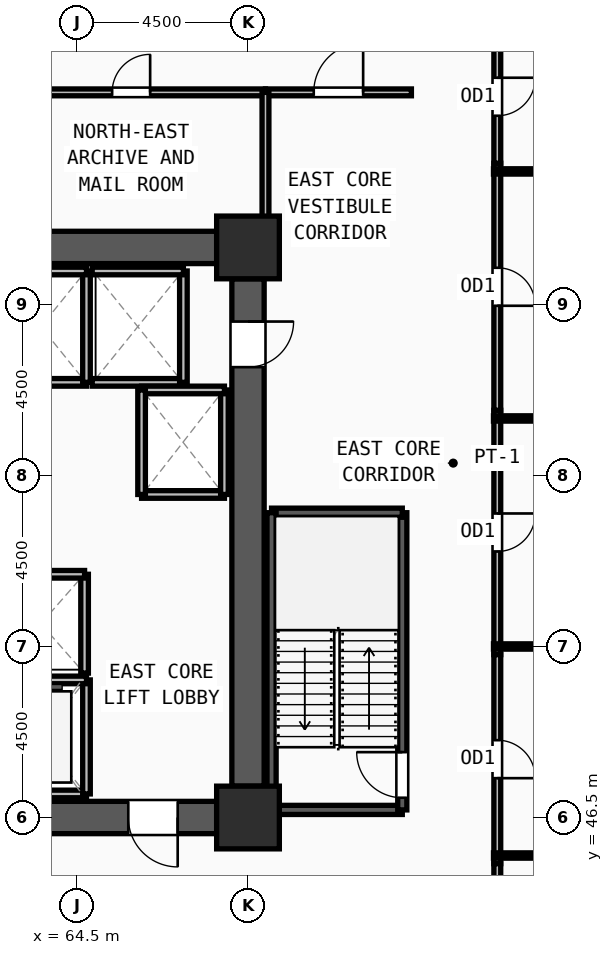
"""IFC4 building model, lengths in metres.
Left out: names, types, materials, properties, quantities, classifications, styles, units other than length and angle.
Written with IfcOpenShell. Run it as: python <this file> out.ifc"""

import sys

from ifc_helpers import new_model, si_unit, direction, frame, frame_2d, origin, origin_2d, place, context, subcontext, project, spatial, rectangle, extrude, source, transform, mapped, element, fill, save


model = new_model("IFC4")
c1 = context("Model", 3, precision=1e-05, world=origin(), true_north=direction((0.0, 1.0)))
c2 = subcontext(c1, "Body", "Model", "MODEL_VIEW")
j1 = project(units=[si_unit("LENGTHUNIT", "METRE"), si_unit("PLANEANGLEUNIT", "RADIAN")], contexts=[c1])
p1 = place(None, origin())
s1 = spatial("IfcSite", under=j1, at=p1, CompositionType="ELEMENT")
p2 = place(p1, origin())
s2 = spatial("IfcBuilding", under=s1, at=p2, CompositionType="ELEMENT")
p3 = place(p2, frame((0.0, 0.0, 74.25)))
s3 = spatial("IfcBuildingStorey", under=s2, at=p3, CompositionType="ELEMENT", Elevation=74.25)
m1 = source(origin(), c2, "Body", "SweptSolid", [
    extrude(rectangle(XDim=1.65, YDim=1.65, at=origin_2d()), origin(), (0.0, 0.0, 1.0), 3.75),
])
for number, where, z_axis, x_axis in (
    (1, (69.0, 46.5, 0.0), (0.0, 0.0, 1.0), (1.0, 0.0, 0.0)),
    (2, (69.0, 61.5, 0.0), (0.0, 0.0, 1.0), (1.0, 0.0, 0.0)),
):
    element("IfcColumn", number, at=place(p3, frame(where, z_axis=z_axis, x_axis=x_axis)), inside=s3, PredefinedType="COLUMN", context=c2, shape_type="MappedRepresentation", body=[
        mapped(m1, transform((0.0, 0.0, 0.0), x_axis=(1.0, 0.0, 0.0), y_axis=(0.0, 1.0, 0.0), z_axis=(0.0, 0.0, 1.0), scale=1.0)),
    ])
p4 = place(p3, frame((60.825, 61.5, 0.0), z_axis=(0.0, 0.0, 1.0), x_axis=(1.0, 0.0, 0.0)))
e3 = element("IfcWall", 3, at=p4, inside=s3, PredefinedType="SHEAR", context=c2, shape_type="SweptSolid", body=[
    extrude(rectangle(XDim=7.35, YDim=0.85, at=frame_2d((3.675, 0.0))), origin(), (0.0, 0.0, 1.0), 3.57),
])
p5 = place(p3, frame((69.0, 60.675, 0.0), z_axis=(0.0, 0.0, 1.0), x_axis=(0.0, -1.0, 0.0)))
e4 = element("IfcWall", 4, at=p5, inside=s3, PredefinedType="SHEAR", context=c2, shape_type="SweptSolid", body=[
    extrude(rectangle(XDim=13.35, YDim=0.85, at=frame_2d((6.675, 0.0))), origin(), (0.0, 0.0, 1.0), 3.57),
])
m2 = source(origin(), c2, "Body", "SweptSolid", [
    extrude(rectangle(XDim=1.2, YDim=2.2, at=frame_2d((0.6, 1.1))), frame((0.0, 0.435, 0.0), z_axis=(0.0, -1.0, 0.0), x_axis=(1.0, 0.0, 0.0)), (0.0, 0.0, 1.0), 0.87),
])
p6 = place(p5, frame((1.125, 0.0, 0.0)))
e5 = element("IfcOpeningElement", 5, at=p6, cuts=e4, PredefinedType="OPENING", context=c2, shape_type="MappedRepresentation", body=[
    mapped(m2, transform((0.0, 0.0, 0.0), x_axis=(1.0, 0.0, 0.0), y_axis=(0.0, 1.0, 0.0), z_axis=(0.0, 0.0, 1.0), scale=1.0)),
])
p7 = place(p3, frame((68.175, 46.5, 0.0), z_axis=(0.0, 0.0, 1.0), x_axis=(-1.0, 0.0, 0.0)))
e6 = element("IfcWall", 6, at=p7, inside=s3, PredefinedType="SHEAR", context=c2, shape_type="SweptSolid", body=[
    extrude(rectangle(XDim=7.35, YDim=0.85, at=frame_2d((3.675, 0.0))), origin(), (0.0, 0.0, 1.0), 3.57),
])
m3 = source(origin(), c2, "Body", "SweptSolid", [
    extrude(rectangle(XDim=1.3, YDim=2.2, at=frame_2d((0.65, 1.1))), frame((0.0, 0.435, 0.0), z_axis=(0.0, -1.0, 0.0), x_axis=(1.0, 0.0, 0.0)), (0.0, 0.0, 1.0), 0.87),
])
p8 = place(p7, frame((1.025, 0.0, 0.0)))
e7 = element("IfcOpeningElement", 7, at=p8, cuts=e6, PredefinedType="OPENING", context=c2, shape_type="MappedRepresentation", body=[
    mapped(m3, transform((0.0, 0.0, 0.0), x_axis=(1.0, 0.0, 0.0), y_axis=(0.0, 1.0, 0.0), z_axis=(0.0, 0.0, 1.0), scale=1.0)),
])
p9 = place(p3, frame((69.62, 46.7, 0.0), z_axis=(0.0, 0.0, 1.0), x_axis=(1.0, 0.0, 0.0)))
e8 = element("IfcWall", 8, at=p9, inside=s3, PredefinedType="SOLIDWALL", context=c2, shape_type="SweptSolid", body=[
    extrude(rectangle(XDim=3.44, YDim=0.24, at=frame_2d((1.72, 0.0))), origin(), (0.0, 0.0, 1.0), 3.57),
])
p10 = place(p3, frame((73.06, 46.7, 0.0), z_axis=(0.0, 0.0, 1.0), x_axis=(0.0, 1.0, 0.0)))
e9 = element("IfcWall", 9, at=p10, inside=s3, PredefinedType="SOLIDWALL", context=c2, shape_type="SweptSolid", body=[
    extrude(rectangle(XDim=7.82, YDim=0.24, at=frame_2d((3.91, 0.0))), origin(), (0.0, 0.0, 1.0), 3.57),
])
m4 = source(origin(), c2, "Body", "SweptSolid", [
    extrude(rectangle(XDim=1.2, YDim=2.2, at=frame_2d((0.6, 1.1))), frame((0.0, 0.13, 0.0), z_axis=(0.0, -1.0, 0.0), x_axis=(1.0, 0.0, 0.0)), (0.0, 0.0, 1.0), 0.26),
])
p11 = place(p10, frame((0.32, 0.0, 0.0)))
e10 = element("IfcOpeningElement", 10, at=p11, cuts=e9, PredefinedType="OPENING", context=c2, shape_type="MappedRepresentation", body=[
    mapped(m4, transform((0.0, 0.0, 0.0), x_axis=(1.0, 0.0, 0.0), y_axis=(0.0, 1.0, 0.0), z_axis=(0.0, 0.0, 1.0), scale=1.0)),
])
p12 = place(p3, frame((73.06, 54.52, 0.0), z_axis=(0.0, 0.0, 1.0), x_axis=(-1.0, 0.0, 0.0)))
e11 = element("IfcWall", 11, at=p12, inside=s3, PredefinedType="SOLIDWALL", context=c2, shape_type="SweptSolid", body=[
    extrude(rectangle(XDim=3.44, YDim=0.24, at=frame_2d((1.72, 0.0))), origin(), (0.0, 0.0, 1.0), 3.57),
])
p13 = place(p3, frame((69.62, 54.52, 0.0), z_axis=(0.0, 0.0, 1.0), x_axis=(0.0, -1.0, 0.0)))
e12 = element("IfcWall", 12, at=p13, inside=s3, PredefinedType="SOLIDWALL", context=c2, shape_type="SweptSolid", body=[
    extrude(rectangle(XDim=7.82, YDim=0.24, at=frame_2d((3.91, 0.0))), origin(), (0.0, 0.0, 1.0), 3.57),
])
p14 = place(p3, frame((62.35, 47.12, 0.0), z_axis=(0.0, 0.0, 1.0), x_axis=(1.0, 0.0, 0.0)))
e13 = element("IfcWall", 13, at=p14, inside=s3, PredefinedType="SOLIDWALL", context=c2, shape_type="SweptSolid", body=[
    extrude(rectangle(XDim=2.4, YDim=0.2, at=frame_2d((1.2, 0.0))), origin(), (0.0, 0.0, 1.0), 3.57),
])
p15 = place(p3, frame((64.75, 47.12, 0.0), z_axis=(0.0, 0.0, 1.0), x_axis=(0.0, 1.0, 0.0)))
e14 = element("IfcWall", 14, at=p15, inside=s3, PredefinedType="SOLIDWALL", context=c2, shape_type="SweptSolid", body=[
    extrude(rectangle(XDim=3.0, YDim=0.2, at=frame_2d((1.5, 0.0))), origin(), (0.0, 0.0, 1.0), 3.57),
])
for number, where, z_axis, x_axis in (
    (15, (64.75, 50.12, 0.0), (0.0, 0.0, 1.0), (-1.0, 0.0, 0.0)),
    (16, (62.35, 57.95, 0.0), (0.0, 0.0, 1.0), (1.0, 0.0, 0.0)),
):
    element("IfcWall", number, at=place(p3, frame(where, z_axis=z_axis, x_axis=x_axis)), inside=s3, PredefinedType="SOLIDWALL", context=c2, shape_type="SweptSolid", body=[
        extrude(rectangle(XDim=2.4, YDim=0.2, at=frame_2d((1.2, 0.0))), origin(), (0.0, 0.0, 1.0), 3.57),
    ])
p16 = place(p3, frame((64.75, 57.95, 0.0), z_axis=(0.0, 0.0, 1.0), x_axis=(0.0, 1.0, 0.0)))
e17 = element("IfcWall", 17, at=p16, inside=s3, PredefinedType="SOLIDWALL", context=c2, shape_type="SweptSolid", body=[
    extrude(rectangle(XDim=2.93, YDim=0.2, at=frame_2d((1.465, 0.0))), origin(), (0.0, 0.0, 1.0), 3.57),
])
p17 = place(p3, frame((64.75, 60.88, 0.0), z_axis=(0.0, 0.0, 1.0), x_axis=(-1.0, 0.0, 0.0)))
e18 = element("IfcWall", 18, at=p17, inside=s3, PredefinedType="SOLIDWALL", context=c2, shape_type="SweptSolid", body=[
    extrude(rectangle(XDim=2.4, YDim=0.2, at=frame_2d((1.2, 0.0))), origin(), (0.0, 0.0, 1.0), 3.57),
])
p18 = place(p3, frame((64.9, 57.95, 0.0), z_axis=(0.0, 0.0, 1.0), x_axis=(1.0, 0.0, 0.0)))
e19 = element("IfcWall", 19, at=p18, inside=s3, PredefinedType="SOLIDWALL", context=c2, shape_type="SweptSolid", body=[
    extrude(rectangle(XDim=2.4, YDim=0.2, at=frame_2d((1.2, 0.0))), origin(), (0.0, 0.0, 1.0), 3.57),
])
p19 = place(p3, frame((67.3, 57.95, 0.0), z_axis=(0.0, 0.0, 1.0), x_axis=(0.0, 1.0, 0.0)))
e20 = element("IfcWall", 20, at=p19, inside=s3, PredefinedType="SOLIDWALL", context=c2, shape_type="SweptSolid", body=[
    extrude(rectangle(XDim=2.93, YDim=0.2, at=frame_2d((1.465, 0.0))), origin(), (0.0, 0.0, 1.0), 3.57),
])
p20 = place(p3, frame((67.3, 60.88, 0.0), z_axis=(0.0, 0.0, 1.0), x_axis=(-1.0, 0.0, 0.0)))
e21 = element("IfcWall", 21, at=p20, inside=s3, PredefinedType="SOLIDWALL", context=c2, shape_type="SweptSolid", body=[
    extrude(rectangle(XDim=2.4, YDim=0.2, at=frame_2d((1.2, 0.0))), origin(), (0.0, 0.0, 1.0), 3.57),
])
p21 = place(p3, frame((66.2, 55.0, 0.0), z_axis=(0.0, 0.0, 1.0), x_axis=(1.0, 0.0, 0.0)))
e22 = element("IfcWall", 22, at=p21, inside=s3, PredefinedType="SOLIDWALL", context=c2, shape_type="SweptSolid", body=[
    extrude(rectangle(XDim=2.18, YDim=0.2, at=frame_2d((1.09, 0.0))), origin(), (0.0, 0.0, 1.0), 3.57),
])
p22 = place(p3, frame((68.38, 55.0, 0.0), z_axis=(0.0, 0.0, 1.0), x_axis=(0.0, 1.0, 0.0)))
e23 = element("IfcWall", 23, at=p22, inside=s3, PredefinedType="SOLIDWALL", context=c2, shape_type="SweptSolid", body=[
    extrude(rectangle(XDim=2.75, YDim=0.2, at=frame_2d((1.375, 0.0))), origin(), (0.0, 0.0, 1.0), 3.57),
])
p23 = place(p3, frame((68.38, 57.75, 0.0), z_axis=(0.0, 0.0, 1.0), x_axis=(-1.0, 0.0, 0.0)))
e24 = element("IfcWall", 24, at=p23, inside=s3, PredefinedType="SOLIDWALL", context=c2, shape_type="SweptSolid", body=[
    extrude(rectangle(XDim=2.18, YDim=0.2, at=frame_2d((1.09, 0.0))), origin(), (0.0, 0.0, 1.0), 3.57),
])
p24 = place(p3, frame((66.2, 57.75, 0.0), z_axis=(0.0, 0.0, 1.0), x_axis=(0.0, -1.0, 0.0)))
e25 = element("IfcWall", 25, at=p24, inside=s3, PredefinedType="SOLIDWALL", context=c2, shape_type="SweptSolid", body=[
    extrude(rectangle(XDim=2.75, YDim=0.2, at=frame_2d((1.375, 0.0))), origin(), (0.0, 0.0, 1.0), 3.57),
])
p25 = place(p3, frame((64.7, 50.3, 0.0), z_axis=(0.0, 0.0, 1.0), x_axis=(0.0, 1.0, 0.0)))
e26 = element("IfcWall", 26, at=p25, inside=s3, PredefinedType="SOLIDWALL", context=c2, shape_type="SweptSolid", body=[
    extrude(rectangle(XDim=2.6, YDim=0.2, at=frame_2d((1.3, 0.0))), origin(), (0.0, 0.0, 1.0), 3.57),
])
p26 = place(p3, frame((64.7, 52.9, 0.0), z_axis=(0.0, 0.0, 1.0), x_axis=(-1.0, 0.0, 0.0)))
e27 = element("IfcWall", 27, at=p26, inside=s3, PredefinedType="SOLIDWALL", context=c2, shape_type="SweptSolid", body=[
    extrude(rectangle(XDim=2.3, YDim=0.2, at=frame_2d((1.15, 0.0))), origin(), (0.0, 0.0, 1.0), 3.57),
])
p27 = place(p3, frame((62.39, 65.58, 0.0), z_axis=(0.0, 0.0, 1.0), x_axis=(1.0, 0.0, 0.0)))
e28 = element("IfcWall", 28, at=p27, inside=s3, PredefinedType="PARTITIONING", context=c2, shape_type="SweptSolid", body=[
    extrude(rectangle(XDim=7.07, YDim=0.18, at=frame_2d((3.535, 0.0))), origin(), (0.0, 0.0, 1.0), 3.57),
])
m5 = source(origin(), c2, "Body", "SweptSolid", [
    extrude(rectangle(XDim=1.0, YDim=2.2, at=frame_2d((0.5, 1.1))), frame((0.0, 0.1, 0.0), z_axis=(0.0, -1.0, 0.0), x_axis=(1.0, 0.0, 0.0)), (0.0, 0.0, 1.0), 0.2),
])
p28 = place(p27, frame((3.035, 0.0, 0.0)))
e29 = element("IfcOpeningElement", 29, at=p28, cuts=e28, PredefinedType="OPENING", context=c2, shape_type="MappedRepresentation", body=[
    mapped(m5, transform((0.0, 0.0, 0.0), x_axis=(1.0, 0.0, 0.0), y_axis=(0.0, 1.0, 0.0), z_axis=(0.0, 0.0, 1.0), scale=1.0)),
])
p29 = place(p3, frame((69.46, 65.58, 0.0), z_axis=(0.0, 0.0, 1.0), x_axis=(1.0, 0.0, 0.0)))
e30 = element("IfcWall", 30, at=p29, inside=s3, PredefinedType="PARTITIONING", context=c2, shape_type="SweptSolid", body=[
    extrude(rectangle(XDim=3.84, YDim=0.18, at=frame_2d((1.92, 0.0))), origin(), (0.0, 0.0, 1.0), 3.57),
])
m6 = source(origin(), c2, "Body", "SweptSolid", [
    extrude(rectangle(XDim=1.3, YDim=2.2, at=frame_2d((0.65, 1.1))), frame((0.0, 0.1, 0.0), z_axis=(0.0, -1.0, 0.0), x_axis=(1.0, 0.0, 0.0)), (0.0, 0.0, 1.0), 0.2),
])
p30 = place(p29, frame((1.27, 0.0, 0.0)))
e31 = element("IfcOpeningElement", 31, at=p30, cuts=e30, PredefinedType="OPENING", context=c2, shape_type="MappedRepresentation", body=[
    mapped(m6, transform((0.0, 0.0, 0.0), x_axis=(1.0, 0.0, 0.0), y_axis=(0.0, 1.0, 0.0), z_axis=(0.0, 0.0, 1.0), scale=1.0)),
])
p31 = place(p3, frame((75.56, 57.215, 0.0), z_axis=(0.0, 0.0, 1.0), x_axis=(0.0, -1.0, 0.0)))
e32 = element("IfcWall", 32, at=p31, inside=s3, PredefinedType="PARTITIONING", context=c2, shape_type="SweptSolid", body=[
    extrude(rectangle(XDim=6.43, YDim=0.18, at=frame_2d((3.215, 0.0))), origin(), (0.0, 0.0, 1.0), 3.57),
])
p32 = place(p31, frame((2.715, 0.0, 0.0)))
e33 = element("IfcOpeningElement", 33, at=p32, cuts=e32, PredefinedType="OPENING", context=c2, shape_type="MappedRepresentation", body=[
    mapped(m5, transform((0.0, 0.0, 0.0), x_axis=(1.0, 0.0, 0.0), y_axis=(0.0, 1.0, 0.0), z_axis=(0.0, 0.0, 1.0), scale=1.0)),
])
p33 = place(p3, frame((75.56, 63.715, 0.0), z_axis=(0.0, 0.0, 1.0), x_axis=(0.0, -1.0, 0.0)))
e34 = element("IfcWall", 34, at=p33, inside=s3, PredefinedType="PARTITIONING", context=c2, shape_type="SweptSolid", body=[
    extrude(rectangle(XDim=6.5, YDim=0.18, at=frame_2d((3.25, 0.0))), origin(), (0.0, 0.0, 1.0), 3.57),
])
p34 = place(p33, frame((2.75, 0.0, 0.0)))
e35 = element("IfcOpeningElement", 35, at=p34, cuts=e34, PredefinedType="OPENING", context=c2, shape_type="MappedRepresentation", body=[
    mapped(m5, transform((0.0, 0.0, 0.0), x_axis=(1.0, 0.0, 0.0), y_axis=(0.0, 1.0, 0.0), z_axis=(0.0, 0.0, 1.0), scale=1.0)),
])
p35 = place(p3, frame((75.56, 67.215, 0.0), z_axis=(0.0, 0.0, 1.0), x_axis=(0.0, -1.0, 0.0)))
e36 = element("IfcWall", 36, at=p35, inside=s3, PredefinedType="PARTITIONING", context=c2, shape_type="SweptSolid", body=[
    extrude(rectangle(XDim=3.5, YDim=0.18, at=frame_2d((1.75, 0.0))), origin(), (0.0, 0.0, 1.0), 3.57),
])
p36 = place(p35, frame((1.25, 0.0, 0.0)))
e37 = element("IfcOpeningElement", 37, at=p36, cuts=e36, PredefinedType="OPENING", context=c2, shape_type="MappedRepresentation", body=[
    mapped(m5, transform((0.0, 0.0, 0.0), x_axis=(1.0, 0.0, 0.0), y_axis=(0.0, 1.0, 0.0), z_axis=(0.0, 0.0, 1.0), scale=1.0)),
])
p37 = place(p3, frame((75.56, 50.785, 0.0), z_axis=(0.0, 0.0, 1.0), x_axis=(0.0, -1.0, 0.0)))
e38 = element("IfcWall", 38, at=p37, inside=s3, PredefinedType="PARTITIONING", context=c2, shape_type="SweptSolid", body=[
    extrude(rectangle(XDim=5.5, YDim=0.18, at=frame_2d((2.75, 0.0))), origin(), (0.0, 0.0, 1.0), 3.57),
])
p38 = place(p37, frame((2.25, 0.0, 0.0)))
e39 = element("IfcOpeningElement", 39, at=p38, cuts=e38, PredefinedType="OPENING", context=c2, shape_type="MappedRepresentation", body=[
    mapped(m5, transform((0.0, 0.0, 0.0), x_axis=(1.0, 0.0, 0.0), y_axis=(0.0, 1.0, 0.0), z_axis=(0.0, 0.0, 1.0), scale=1.0)),
])
p39 = place(p3, frame((69.46, 61.95, 0.0), z_axis=(0.0, 0.0, 1.0), x_axis=(0.0, 1.0, 0.0)))
e40 = element("IfcWall", 40, at=p39, inside=s3, PredefinedType="PARTITIONING", context=c2, shape_type="SweptSolid", body=[
    extrude(rectangle(XDim=3.63, YDim=0.18, at=frame_2d((1.815, 0.0))), origin(), (0.0, 0.0, 1.0), 3.57),
])
p40 = place(p3, frame((75.56, 45.285, 0.0), z_axis=(0.0, 0.0, 1.0), x_axis=(0.0, -1.0, 0.0)))
e41 = element("IfcWall", 41, at=p40, inside=s3, PredefinedType="PARTITIONING", context=c2, shape_type="SweptSolid", body=[
    extrude(rectangle(XDim=1.615, YDim=0.18, at=frame_2d((0.808, 0.0))), origin(), (0.0, 0.0, 1.0), 3.57),
])
p41 = place(p3, frame((75.46, 45.5, 0.0), z_axis=(0.0, 0.0, 1.0), x_axis=(1.0, 0.0, 0.0)))
e42 = element("IfcWall", 42, at=p41, inside=s3, PredefinedType="PARTITIONING", context=c2, shape_type="SweptSolid", body=[
    extrude(rectangle(XDim=11.759, YDim=0.14, at=frame_2d((5.879, 0.0))), origin(), (0.0, 0.0, 1.0), 3.57),
])
p42 = place(p3, frame((75.46, 51.0, 0.0), z_axis=(0.0, 0.0, 1.0), x_axis=(1.0, 0.0, 0.0)))
e43 = element("IfcWall", 43, at=p42, inside=s3, PredefinedType="PARTITIONING", context=c2, shape_type="SweptSolid", body=[
    extrude(rectangle(XDim=14.456, YDim=0.14, at=frame_2d((7.228, 0.0))), origin(), (0.0, 0.0, 1.0), 3.57),
])
p43 = place(p3, frame((75.46, 57.0, 0.0), z_axis=(0.0, 0.0, 1.0), x_axis=(1.0, 0.0, 0.0)))
e44 = element("IfcWall", 44, at=p43, inside=s3, PredefinedType="PARTITIONING", context=c2, shape_type="SweptSolid", body=[
    extrude(rectangle(XDim=17.398, YDim=0.14, at=frame_2d((8.699, 0.0))), origin(), (0.0, 0.0, 1.0), 3.57),
])
p44 = place(p3, frame((75.46, 63.5, 0.0), z_axis=(0.0, 0.0, 1.0), x_axis=(1.0, 0.0, 0.0)))
e45 = element("IfcWall", 45, at=p44, inside=s3, PredefinedType="PARTITIONING", context=c2, shape_type="SweptSolid", body=[
    extrude(rectangle(XDim=20.585, YDim=0.14, at=frame_2d((10.292, 0.0))), origin(), (0.0, 0.0, 1.0), 2.655),
])
m7 = source(origin(), c2, "Body", "SweptSolid", [
    extrude(rectangle(XDim=1.3, YDim=2.2, at=frame_2d((0.65, 1.1))), frame((0.0, 0.025, 0.0), z_axis=(0.0, -1.0, 0.0), x_axis=(1.0, 0.0, 0.0)), (0.0, 0.0, 1.0), 0.05),
])
p45 = place(p8, origin())
e46 = element("IfcDoor", 46, at=p45, inside=s3, OperationType="SINGLE_SWING_LEFT", PredefinedType="DOOR", context=c2, shape_type="MappedRepresentation", body=[
    mapped(m7, transform((0.0, 0.0, 0.0), x_axis=(1.0, 0.0, 0.0), y_axis=(0.0, 1.0, 0.0), z_axis=(0.0, 0.0, 1.0), scale=1.0)),
])
fill(e7, e46)
m8 = source(origin(), c2, "Body", "SweptSolid", [
    extrude(rectangle(XDim=1.2, YDim=2.2, at=frame_2d((0.6, 1.1))), frame((0.0, 0.025, 0.0), z_axis=(0.0, -1.0, 0.0), x_axis=(1.0, 0.0, 0.0)), (0.0, 0.0, 1.0), 0.05),
])
p46 = place(p6, origin())
e47 = element("IfcDoor", 47, at=p46, inside=s3, OperationType="SINGLE_SWING_LEFT", PredefinedType="DOOR", context=c2, shape_type="MappedRepresentation", body=[
    mapped(m8, transform((0.0, 0.0, 0.0), x_axis=(1.0, 0.0, 0.0), y_axis=(0.0, 1.0, 0.0), z_axis=(0.0, 0.0, 1.0), scale=1.0)),
])
fill(e5, e47)
p47 = place(p11, origin())
e48 = element("IfcDoor", 48, at=p47, inside=s3, OperationType="SINGLE_SWING_RIGHT", PredefinedType="DOOR", context=c2, shape_type="MappedRepresentation", body=[
    mapped(m8, transform((0.0, 0.0, 0.0), x_axis=(1.0, 0.0, 0.0), y_axis=(0.0, 1.0, 0.0), z_axis=(0.0, 0.0, 1.0), scale=1.0)),
])
fill(e10, e48)
m9 = source(origin(), c2, "Body", "SweptSolid", [
    extrude(rectangle(XDim=1.0, YDim=2.2, at=frame_2d((0.5, 1.1))), frame((0.0, 0.025, 0.0), z_axis=(0.0, -1.0, 0.0), x_axis=(1.0, 0.0, 0.0)), (0.0, 0.0, 1.0), 0.05),
])
p48 = place(p28, origin())
e49 = element("IfcDoor", 49, at=p48, inside=s3, OperationType="SINGLE_SWING_RIGHT", PredefinedType="DOOR", context=c2, shape_type="MappedRepresentation", body=[
    mapped(m9, transform((0.0, 0.0, 0.0), x_axis=(1.0, 0.0, 0.0), y_axis=(0.0, 1.0, 0.0), z_axis=(0.0, 0.0, 1.0), scale=1.0)),
])
fill(e29, e49)
p49 = place(p30, origin())
e50 = element("IfcDoor", 50, at=p49, inside=s3, OperationType="SINGLE_SWING_RIGHT", PredefinedType="DOOR", context=c2, shape_type="MappedRepresentation", body=[
    mapped(m7, transform((0.0, 0.0, 0.0), x_axis=(1.0, 0.0, 0.0), y_axis=(0.0, 1.0, 0.0), z_axis=(0.0, 0.0, 1.0), scale=1.0)),
])
fill(e31, e50)
p50 = place(p32, origin())
e51 = element("IfcDoor", 51, at=p50, inside=s3, OperationType="SINGLE_SWING_LEFT", PredefinedType="DOOR", context=c2, shape_type="MappedRepresentation", body=[
    mapped(m9, transform((0.0, 0.0, 0.0), x_axis=(1.0, 0.0, 0.0), y_axis=(0.0, 1.0, 0.0), z_axis=(0.0, 0.0, 1.0), scale=1.0)),
])
fill(e33, e51)
p51 = place(p34, origin())
e52 = element("IfcDoor", 52, at=p51, inside=s3, OperationType="SINGLE_SWING_RIGHT", PredefinedType="DOOR", context=c2, shape_type="MappedRepresentation", body=[
    mapped(m9, transform((0.0, 0.0, 0.0), x_axis=(1.0, 0.0, 0.0), y_axis=(0.0, 1.0, 0.0), z_axis=(0.0, 0.0, 1.0), scale=1.0)),
])
fill(e35, e52)
p52 = place(p36, origin())
e53 = element("IfcDoor", 53, at=p52, inside=s3, OperationType="SINGLE_SWING_LEFT", PredefinedType="DOOR", context=c2, shape_type="MappedRepresentation", body=[
    mapped(m9, transform((0.0, 0.0, 0.0), x_axis=(1.0, 0.0, 0.0), y_axis=(0.0, 1.0, 0.0), z_axis=(0.0, 0.0, 1.0), scale=1.0)),
])
fill(e37, e53)
p53 = place(p38, origin())
e54 = element("IfcDoor", 54, at=p53, inside=s3, OperationType="SINGLE_SWING_RIGHT", PredefinedType="DOOR", context=c2, shape_type="MappedRepresentation", body=[
    mapped(m9, transform((0.0, 0.0, 0.0), x_axis=(1.0, 0.0, 0.0), y_axis=(0.0, 1.0, 0.0), z_axis=(0.0, 0.0, 1.0), scale=1.0)),
])
fill(e39, e54)
save(model, sys.argv[1])
